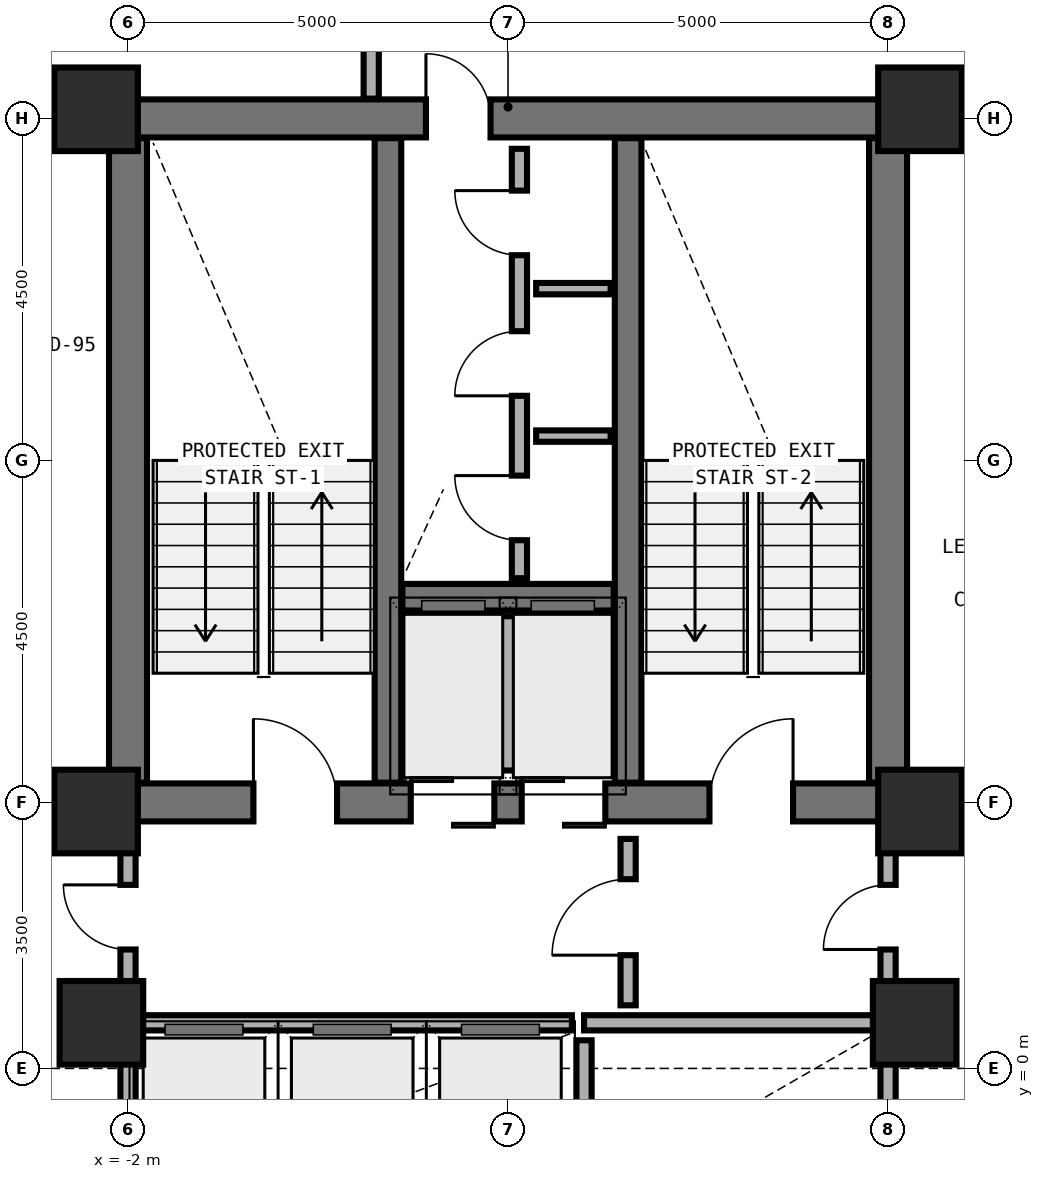
"""IFC4 building model, lengths in metres.
Left out: names, types, materials, properties, quantities, classifications, styles, units other than length and angle.
Written with IfcOpenShell. Run it as: python <this file> out.ifc"""

import sys

from ifc_helpers import new_model, si_unit, direction, frame, frame_2d, origin, origin_2d, place, context, subcontext, project, spatial, rectangle, extrude, element, fill, save


model = new_model("IFC4")
c1 = context("Model", 3, precision=1e-05, world=origin(), true_north=direction((0.0, 1.0)))
c2 = subcontext(c1, "Body", "Model", "MODEL_VIEW")
j1 = project(units=[si_unit("LENGTHUNIT", "METRE"), si_unit("PLANEANGLEUNIT", "RADIAN")], contexts=[c1])
p1 = place(None, origin())
s1 = spatial("IfcSite", under=j1, at=p1, CompositionType="ELEMENT")
p2 = place(p1, origin())
s2 = spatial("IfcBuilding", under=s1, at=p2, CompositionType="ELEMENT")
p3 = place(p2, frame((0.0, 0.0, 95.4)))
s3 = spatial("IfcBuildingStorey", under=s2, at=p3, CompositionType="ELEMENT", Elevation=95.4)
p4 = place(p3, frame((-2.0, 3.5, 0.0), z_axis=(0.0, 0.0, 1.0), x_axis=(1.0, 0.0, 0.0)))
e1 = element("IfcWall", 1, at=p4, inside=s3, PredefinedType="SHEAR", context=c2, shape_type="SweptSolid", body=[
    extrude(rectangle(XDim=10.0, YDim=0.5, at=frame_2d((5.0, 0.0))), origin(), (0.0, 0.0, 1.0), 3.892),
])
p5 = place(p4, frame((1.65, 0.0, 0.0)))
e2 = element("IfcOpeningElement", 2, at=p5, cuts=e1, PredefinedType="OPENING", context=c2, shape_type="SweptSolid", body=[
    extrude(rectangle(XDim=1.1, YDim=2.15, at=frame_2d((0.55, 1.075))), frame((0.0, 0.26, 0.0), z_axis=(0.0, -1.0, 0.0), x_axis=(1.0, 0.0, 0.0)), (0.0, 0.0, 1.0), 0.52),
])
p6 = place(p4, frame((7.65, 0.0, 0.0)))
e3 = element("IfcOpeningElement", 3, at=p6, cuts=e1, PredefinedType="OPENING", context=c2, shape_type="SweptSolid", body=[
    extrude(rectangle(XDim=1.1, YDim=2.15, at=frame_2d((0.55, 1.075))), frame((0.0, 0.26, 0.0), z_axis=(0.0, -1.0, 0.0), x_axis=(1.0, 0.0, 0.0)), (0.0, 0.0, 1.0), 0.52),
])
p7 = place(p4, frame((3.72, 0.0, 0.0)))
e4 = element("IfcOpeningElement", 4, at=p7, cuts=e1, PredefinedType="OPENING", context=c2, shape_type="SweptSolid", body=[
    extrude(rectangle(XDim=1.1, YDim=2.2, at=frame_2d((0.55, 1.1))), frame((0.0, 0.26, 0.0), z_axis=(0.0, -1.0, 0.0), x_axis=(1.0, 0.0, 0.0)), (0.0, 0.0, 1.0), 0.52),
])
p8 = place(p4, frame((5.18, 0.0, 0.0)))
e5 = element("IfcOpeningElement", 5, at=p8, cuts=e1, PredefinedType="OPENING", context=c2, shape_type="SweptSolid", body=[
    extrude(rectangle(XDim=1.1, YDim=2.2, at=frame_2d((0.55, 1.1))), frame((0.0, 0.26, 0.0), z_axis=(0.0, -1.0, 0.0), x_axis=(1.0, 0.0, 0.0)), (0.0, 0.0, 1.0), 0.52),
])
p9 = place(p3, frame((-2.0, 12.5, 0.0), z_axis=(0.0, 0.0, 1.0), x_axis=(1.0, 0.0, 0.0)))
e6 = element("IfcWall", 6, at=p9, inside=s3, PredefinedType="SHEAR", context=c2, shape_type="SweptSolid", body=[
    extrude(rectangle(XDim=10.0, YDim=0.5, at=frame_2d((5.0, 0.0))), origin(), (0.0, 0.0, 1.0), 3.892),
])
p10 = place(p9, frame((3.92, 0.0, 0.0)))
e7 = element("IfcOpeningElement", 7, at=p10, cuts=e6, PredefinedType="OPENING", context=c2, shape_type="SweptSolid", body=[
    extrude(rectangle(XDim=0.85, YDim=2.1, at=frame_2d((0.425, 1.05))), frame((0.0, 0.26, 0.0), z_axis=(0.0, -1.0, 0.0), x_axis=(1.0, 0.0, 0.0)), (0.0, 0.0, 1.0), 0.52),
])
for number, where, z_axis, x_axis in (
    (8, (-2.0, 3.76, 0.0), (0.0, 0.0, 1.0), (0.0, 1.0, 0.0)),
    (9, (8.0, 3.76, 0.0), (0.0, 0.0, 1.0), (0.0, 1.0, 0.0)),
):
    element("IfcWall", number, at=place(p3, frame(where, z_axis=z_axis, x_axis=x_axis)), inside=s3, PredefinedType="SHEAR", context=c2, shape_type="SweptSolid", body=[
        extrude(rectangle(XDim=8.48, YDim=0.5, at=frame_2d((4.24, 0.0))), origin(), (0.0, 0.0, 1.0), 3.892),
    ])
for number, where, z_axis, x_axis in (
    (10, (1.42, 3.76, 0.0), (0.0, 0.0, 1.0), (0.0, 1.0, 0.0)),
    (11, (4.58, 3.76, 0.0), (0.0, 0.0, 1.0), (0.0, 1.0, 0.0)),
):
    element("IfcWall", number, at=place(p3, frame(where, z_axis=z_axis, x_axis=x_axis)), inside=s3, PredefinedType="SHEAR", context=c2, shape_type="SweptSolid", body=[
        extrude(rectangle(XDim=8.48, YDim=0.35, at=frame_2d((4.24, 0.0))), origin(), (0.0, 0.0, 1.0), 3.892),
    ])
p11 = place(p3, frame((1.61, 6.2, 0.0), z_axis=(0.0, 0.0, 1.0), x_axis=(1.0, 0.0, 0.0)))
e12 = element("IfcWall", 12, at=p11, inside=s3, PredefinedType="SHEAR", context=c2, shape_type="SweptSolid", body=[
    extrude(rectangle(XDim=2.78, YDim=0.35, at=frame_2d((1.39, 0.0))), origin(), (0.0, 0.0, 1.0), 3.892),
])
for number, where, z_axis, x_axis in (
    (13, (-2.42, 12.62, 0.0), (0.0, 0.0, 1.0), (1.0, 0.0, 0.0)),
    (14, (8.42, 12.62, 0.0), (0.0, 0.0, 1.0), (1.0, 0.0, 0.0)),
    (15, (-2.42, 3.38, 0.0), (0.0, 0.0, 1.0), (1.0, 0.0, 0.0)),
    (16, (8.42, 3.38, 0.0), (0.0, 0.0, 1.0), (1.0, 0.0, 0.0)),
    (17, (-2.35, 0.6, 0.0), (0.0, 0.0, 1.0), (1.0, 0.0, 0.0)),
    (18, (8.35, 0.6, 0.0), (0.0, 0.0, 1.0), (1.0, 0.0, 0.0)),
):
    element("IfcColumn", number, at=place(p3, frame(where, z_axis=z_axis, x_axis=x_axis)), inside=s3, PredefinedType="COLUMN", context=c2, shape_type="SweptSolid", body=[
        extrude(rectangle(XDim=1.1, YDim=1.1, at=origin_2d()), origin(), (0.0, 0.0, 1.0), 3.875),
    ])
p12 = place(p3, frame((3.0, 3.92, 0.0), z_axis=(0.0, 0.0, 1.0), x_axis=(0.0, 1.0, 0.0)))
e19 = element("IfcWall", 19, at=p12, inside=s3, PredefinedType="SOLIDWALL", context=c2, shape_type="SweptSolid", body=[
    extrude(rectangle(XDim=2.03, YDim=0.2, at=frame_2d((1.015, 0.0))), origin(), (0.0, 0.0, 1.0), 3.64),
])
p13 = place(p3, frame((4.0, 0.6, 0.0), z_axis=(0.0, 0.0, 1.0), x_axis=(1.0, 0.0, 0.0)))
e20 = element("IfcWall", 20, at=p13, inside=s3, PredefinedType="SOLIDWALL", context=c2, shape_type="SweptSolid", body=[
    extrude(rectangle(XDim=3.88, YDim=0.2, at=frame_2d((1.94, 0.0))), origin(), (0.0, 0.0, 1.0), 3.172),
])
p14 = place(p3, frame((-2.0, -1.57, 0.0), z_axis=(0.0, 0.0, 1.0), x_axis=(0.0, 1.0, 0.0)))
e21 = element("IfcWall", 21, at=p14, inside=s3, PredefinedType="SOLIDWALL", context=c2, shape_type="SweptSolid", body=[
    extrude(rectangle(XDim=2.05, YDim=0.2, at=frame_2d((1.025, 0.0))), origin(), (0.0, 0.0, 1.0), 3.022),
])
p15 = place(p3, frame((4.0, -1.57, 0.0), z_axis=(0.0, 0.0, 1.0), x_axis=(0.0, 1.0, 0.0)))
e22 = element("IfcWall", 22, at=p15, inside=s3, PredefinedType="SOLIDWALL", context=c2, shape_type="SweptSolid", body=[
    extrude(rectangle(XDim=1.94, YDim=0.2, at=frame_2d((0.97, 0.0))), origin(), (0.0, 0.0, 1.0), 3.64),
])
p16 = place(p3, frame((8.0, -1.57, 0.0), z_axis=(0.0, 0.0, 1.0), x_axis=(0.0, 1.0, 0.0)))
e23 = element("IfcWall", 23, at=p16, inside=s3, PredefinedType="SOLIDWALL", context=c2, shape_type="SweptSolid", body=[
    extrude(rectangle(XDim=2.05, YDim=0.2, at=frame_2d((1.025, 0.0))), origin(), (0.0, 0.0, 1.0), 3.072),
])
p17 = place(p3, frame((3.15, 6.45, 0.0), z_axis=(0.0, 0.0, 1.0), x_axis=(0.0, 1.0, 0.0)))
e24 = element("IfcWall", 24, at=p17, inside=s3, PredefinedType="MOVABLE", context=c2, shape_type="SweptSolid", body=[
    extrude(rectangle(XDim=5.65, YDim=0.2, at=frame_2d((2.825, 0.0))), origin(), (0.0, 0.0, 1.0), 3.64),
])
p18 = place(p17, frame((0.5, 0.0, 0.0)))
e25 = element("IfcOpeningElement", 25, at=p18, cuts=e24, PredefinedType="OPENING", context=c2, shape_type="SweptSolid", body=[
    extrude(rectangle(XDim=0.85, YDim=2.1, at=frame_2d((0.425, 1.05))), frame((0.0, 0.11, 0.0), z_axis=(0.0, -1.0, 0.0), x_axis=(1.0, 0.0, 0.0)), (0.0, 0.0, 1.0), 0.22),
])
p19 = place(p17, frame((2.4, 0.0, 0.0)))
e26 = element("IfcOpeningElement", 26, at=p19, cuts=e24, PredefinedType="OPENING", context=c2, shape_type="SweptSolid", body=[
    extrude(rectangle(XDim=0.85, YDim=2.1, at=frame_2d((0.425, 1.05))), frame((0.0, 0.11, 0.0), z_axis=(0.0, -1.0, 0.0), x_axis=(1.0, 0.0, 0.0)), (0.0, 0.0, 1.0), 0.22),
])
p20 = place(p17, frame((4.25, 0.0, 0.0)))
e27 = element("IfcOpeningElement", 27, at=p20, cuts=e24, PredefinedType="OPENING", context=c2, shape_type="SweptSolid", body=[
    extrude(rectangle(XDim=0.85, YDim=2.1, at=frame_2d((0.425, 1.05))), frame((0.0, 0.11, 0.0), z_axis=(0.0, -1.0, 0.0), x_axis=(1.0, 0.0, 0.0)), (0.0, 0.0, 1.0), 0.22),
])
p21 = place(p3, frame((4.58, 0.83, 0.0), z_axis=(0.0, 0.0, 1.0), x_axis=(0.0, 1.0, 0.0)))
e28 = element("IfcWall", 28, at=p21, inside=s3, PredefinedType="MOVABLE", context=c2, shape_type="SweptSolid", body=[
    extrude(rectangle(XDim=2.19, YDim=0.2, at=frame_2d((1.095, 0.0))), origin(), (0.0, 0.0, 1.0), 3.64),
])
p22 = place(p21, frame((0.66, 0.0, 0.0)))
e29 = element("IfcOpeningElement", 29, at=p22, cuts=e28, PredefinedType="OPENING", context=c2, shape_type="SweptSolid", body=[
    extrude(rectangle(XDim=1.0, YDim=2.1, at=frame_2d((0.5, 1.05))), frame((0.0, 0.11, 0.0), z_axis=(0.0, -1.0, 0.0), x_axis=(1.0, 0.0, 0.0)), (0.0, 0.0, 1.0), 0.22),
])
p23 = place(p3, frame((-2.0, 0.72, 0.0), z_axis=(0.0, 0.0, 1.0), x_axis=(0.0, 1.0, 0.0)))
e30 = element("IfcWall", 30, at=p23, inside=s3, PredefinedType="MOVABLE", context=c2, shape_type="SweptSolid", body=[
    extrude(rectangle(XDim=2.3, YDim=0.2, at=frame_2d((1.15, 0.0))), origin(), (0.0, 0.0, 1.0), 2.872),
])
p24 = place(p23, frame((0.845, 0.0, 0.0)))
e31 = element("IfcOpeningElement", 31, at=p24, cuts=e30, PredefinedType="OPENING", context=c2, shape_type="SweptSolid", body=[
    extrude(rectangle(XDim=0.85, YDim=2.1, at=frame_2d((0.425, 1.05))), frame((0.0, 0.11, 0.0), z_axis=(0.0, -1.0, 0.0), x_axis=(1.0, 0.0, 0.0)), (0.0, 0.0, 1.0), 0.22),
])
p25 = place(p3, frame((8.0, 0.72, 0.0), z_axis=(0.0, 0.0, 1.0), x_axis=(0.0, 1.0, 0.0)))
e32 = element("IfcWall", 32, at=p25, inside=s3, PredefinedType="MOVABLE", context=c2, shape_type="SweptSolid", body=[
    extrude(rectangle(XDim=2.3, YDim=0.2, at=frame_2d((1.15, 0.0))), origin(), (0.0, 0.0, 1.0), 2.872),
])
p26 = place(p25, frame((0.845, 0.0, 0.0)))
e33 = element("IfcOpeningElement", 33, at=p26, cuts=e32, PredefinedType="OPENING", context=c2, shape_type="SweptSolid", body=[
    extrude(rectangle(XDim=0.85, YDim=2.1, at=frame_2d((0.425, 1.05))), frame((0.0, 0.11, 0.0), z_axis=(0.0, -1.0, 0.0), x_axis=(1.0, 0.0, 0.0)), (0.0, 0.0, 1.0), 0.22),
])
for number, where, z_axis, x_axis in (
    (34, (3.37, 8.32, 0.0), (0.0, 0.0, 1.0), (1.0, 0.0, 0.0)),
    (35, (3.37, 10.26, 0.0), (0.0, 0.0, 1.0), (1.0, 0.0, 0.0)),
):
    element("IfcWall", number, at=place(p3, frame(where, z_axis=z_axis, x_axis=x_axis)), inside=s3, PredefinedType="PARTITIONING", context=c2, shape_type="SweptSolid", body=[
        extrude(rectangle(XDim=0.98, YDim=0.15, at=frame_2d((0.49, 0.0))), origin(), (0.0, 0.0, 1.0), 3.64),
    ])
p27 = place(p3, frame((-1.88, 0.6, 0.0), z_axis=(0.0, 0.0, 1.0), x_axis=(1.0, 0.0, 0.0)))
e36 = element("IfcWall", 36, at=p27, inside=s3, PredefinedType="MOVABLE", context=c2, shape_type="SweptSolid", body=[
    extrude(rectangle(XDim=5.72, YDim=0.2, at=frame_2d((2.86, 0.0))), origin(), (0.0, 0.0, 1.0), 3.172),
])
p28 = place(p3, frame((1.2, 14.7, 0.0), z_axis=(0.0, 0.0, 1.0), x_axis=(0.0, -1.0, 0.0)))
e37 = element("IfcWall", 37, at=p28, inside=s3, PredefinedType="MOVABLE", context=c2, shape_type="SweptSolid", body=[
    extrude(rectangle(XDim=1.94, YDim=0.2, at=frame_2d((0.97, 0.0))), origin(), (0.0, 0.0, 1.0), 3.64),
])
p29 = place(p5, origin())
e38 = element("IfcDoor", 38, at=p29, inside=s3, OperationType="SINGLE_SWING_LEFT", PredefinedType="DOOR", context=c2, shape_type="SweptSolid", body=[
    extrude(rectangle(XDim=1.1, YDim=2.15, at=frame_2d((0.55, 1.075))), frame((0.0, 0.025, 0.0), z_axis=(0.0, -1.0, 0.0), x_axis=(1.0, 0.0, 0.0)), (0.0, 0.0, 1.0), 0.05),
])
fill(e2, e38)
p30 = place(p6, origin())
e39 = element("IfcDoor", 39, at=p30, inside=s3, OperationType="SINGLE_SWING_RIGHT", PredefinedType="DOOR", context=c2, shape_type="SweptSolid", body=[
    extrude(rectangle(XDim=1.1, YDim=2.15, at=frame_2d((0.55, 1.075))), frame((0.0, 0.025, 0.0), z_axis=(0.0, -1.0, 0.0), x_axis=(1.0, 0.0, 0.0)), (0.0, 0.0, 1.0), 0.05),
])
fill(e3, e39)
p31 = place(p7, origin())
e40 = element("IfcDoor", 40, at=p31, inside=s3, OperationType="DOUBLE_DOOR_SLIDING", PredefinedType="DOOR", context=c2, shape_type="SweptSolid", body=[
    extrude(rectangle(XDim=1.1, YDim=2.2, at=frame_2d((0.55, 1.1))), frame((0.0, 0.025, 0.0), z_axis=(0.0, -1.0, 0.0), x_axis=(1.0, 0.0, 0.0)), (0.0, 0.0, 1.0), 0.05),
])
fill(e4, e40)
p32 = place(p8, origin())
e41 = element("IfcDoor", 41, at=p32, inside=s3, OperationType="DOUBLE_DOOR_SLIDING", PredefinedType="DOOR", context=c2, shape_type="SweptSolid", body=[
    extrude(rectangle(XDim=1.1, YDim=2.2, at=frame_2d((0.55, 1.1))), frame((0.0, 0.025, 0.0), z_axis=(0.0, -1.0, 0.0), x_axis=(1.0, 0.0, 0.0)), (0.0, 0.0, 1.0), 0.05),
])
fill(e5, e41)
p33 = place(p10, origin())
e42 = element("IfcDoor", 42, at=p33, inside=s3, OperationType="SINGLE_SWING_LEFT", PredefinedType="DOOR", context=c2, shape_type="SweptSolid", body=[
    extrude(rectangle(XDim=0.85, YDim=2.1, at=frame_2d((0.425, 1.05))), frame((0.0, 0.025, 0.0), z_axis=(0.0, -1.0, 0.0), x_axis=(1.0, 0.0, 0.0)), (0.0, 0.0, 1.0), 0.05),
])
fill(e7, e42)
p34 = place(p18, origin())
e43 = element("IfcDoor", 43, at=p34, inside=s3, OperationType="SINGLE_SWING_RIGHT", PredefinedType="DOOR", context=c2, shape_type="SweptSolid", body=[
    extrude(rectangle(XDim=0.85, YDim=2.1, at=frame_2d((0.425, 1.05))), frame((0.0, 0.025, 0.0), z_axis=(0.0, -1.0, 0.0), x_axis=(1.0, 0.0, 0.0)), (0.0, 0.0, 1.0), 0.05),
])
fill(e25, e43)
p35 = place(p19, origin())
e44 = element("IfcDoor", 44, at=p35, inside=s3, OperationType="SINGLE_SWING_LEFT", PredefinedType="DOOR", context=c2, shape_type="SweptSolid", body=[
    extrude(rectangle(XDim=0.85, YDim=2.1, at=frame_2d((0.425, 1.05))), frame((0.0, 0.025, 0.0), z_axis=(0.0, -1.0, 0.0), x_axis=(1.0, 0.0, 0.0)), (0.0, 0.0, 1.0), 0.05),
])
fill(e26, e44)
p36 = place(p20, origin())
e45 = element("IfcDoor", 45, at=p36, inside=s3, OperationType="SINGLE_SWING_RIGHT", PredefinedType="DOOR", context=c2, shape_type="SweptSolid", body=[
    extrude(rectangle(XDim=0.85, YDim=2.1, at=frame_2d((0.425, 1.05))), frame((0.0, 0.025, 0.0), z_axis=(0.0, -1.0, 0.0), x_axis=(1.0, 0.0, 0.0)), (0.0, 0.0, 1.0), 0.05),
])
fill(e27, e45)
p37 = place(p22, origin())
e46 = element("IfcDoor", 46, at=p37, inside=s3, OperationType="SINGLE_SWING_LEFT", PredefinedType="DOOR", context=c2, shape_type="SweptSolid", body=[
    extrude(rectangle(XDim=1.0, YDim=2.1, at=frame_2d((0.5, 1.05))), frame((0.0, 0.025, 0.0), z_axis=(0.0, -1.0, 0.0), x_axis=(1.0, 0.0, 0.0)), (0.0, 0.0, 1.0), 0.05),
])
fill(e29, e46)
p38 = place(p24, origin())
e47 = element("IfcDoor", 47, at=p38, inside=s3, OperationType="SINGLE_SWING_RIGHT", PredefinedType="DOOR", context=c2, shape_type="SweptSolid", body=[
    extrude(rectangle(XDim=0.85, YDim=2.1, at=frame_2d((0.425, 1.05))), frame((0.0, 0.025, 0.0), z_axis=(0.0, -1.0, 0.0), x_axis=(1.0, 0.0, 0.0)), (0.0, 0.0, 1.0), 0.05),
])
fill(e31, e47)
p39 = place(p26, origin())
e48 = element("IfcDoor", 48, at=p39, inside=s3, OperationType="SINGLE_SWING_LEFT", PredefinedType="DOOR", context=c2, shape_type="SweptSolid", body=[
    extrude(rectangle(XDim=0.85, YDim=2.1, at=frame_2d((0.425, 1.05))), frame((0.0, 0.025, 0.0), z_axis=(0.0, -1.0, 0.0), x_axis=(1.0, 0.0, 0.0)), (0.0, 0.0, 1.0), 0.05),
])
fill(e33, e48)
save(model, sys.argv[1])
